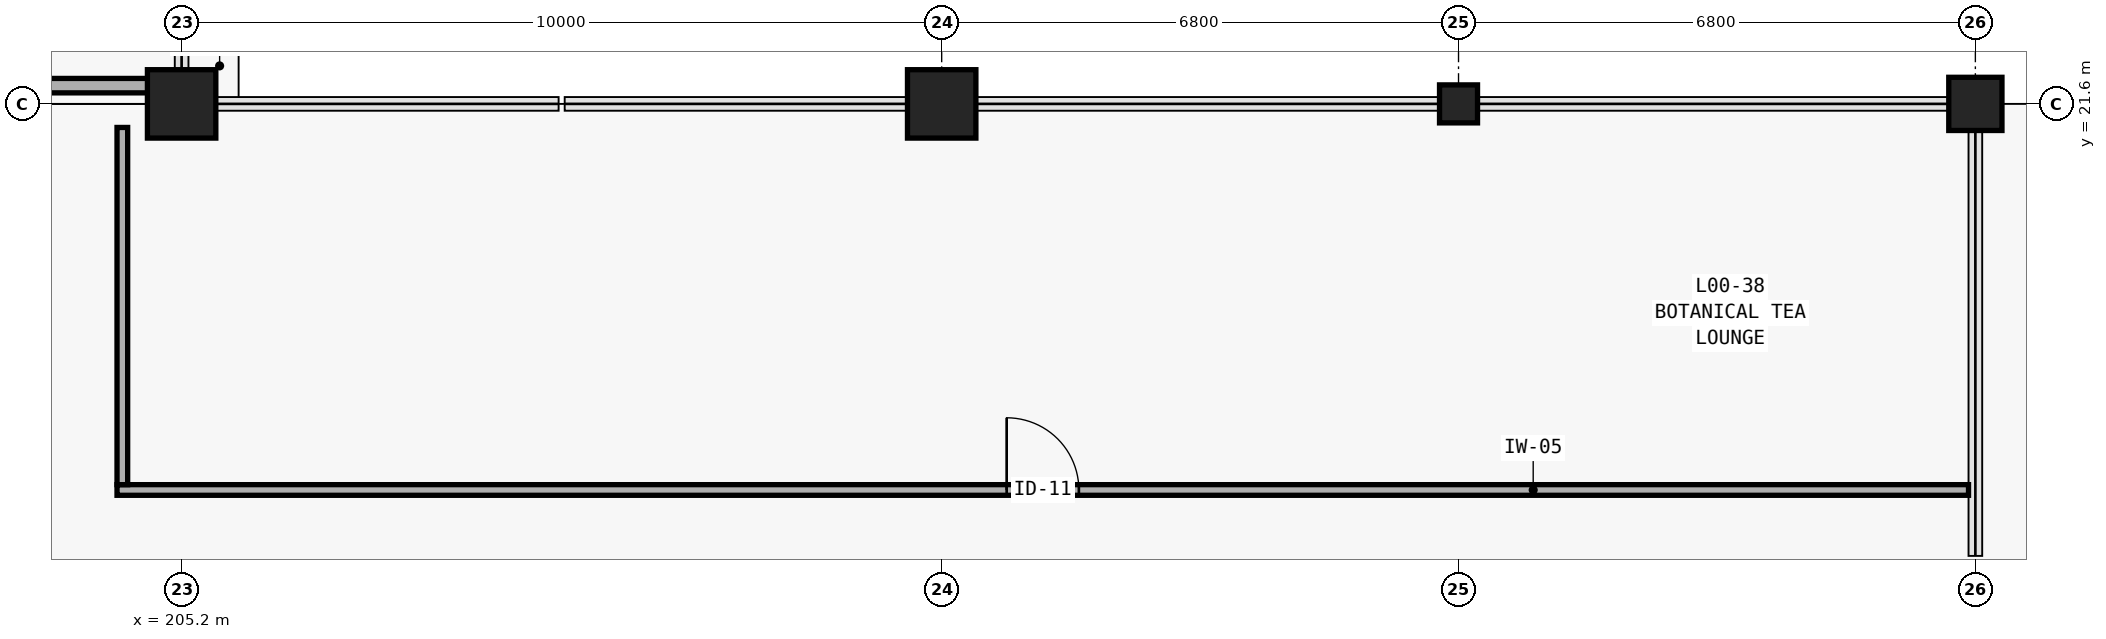
"""IFC4 building model, lengths in metres.
Left out: names, types, materials, properties, quantities, classifications, styles, units other than length and angle.
Written with IfcOpenShell. Run it as: python <this file> out.ifc"""

import sys

from ifc_helpers import new_model, si_unit, direction, frame, frame_2d, origin, origin_2d, place, context, subcontext, project, spatial, rectangle, extrude, element, fill, save


model = new_model("IFC4")
c1 = context("Model", 3, precision=1e-05, world=origin(), true_north=direction((0.0, 1.0)))
c2 = subcontext(c1, "Body", "Model", "MODEL_VIEW")
j1 = project(units=[si_unit("LENGTHUNIT", "METRE"), si_unit("PLANEANGLEUNIT", "RADIAN")], contexts=[c1])
p1 = place(None, origin())
s1 = spatial("IfcSite", under=j1, at=p1, CompositionType="ELEMENT")
p2 = place(p1, origin())
s2 = spatial("IfcBuilding", under=s1, at=p2, CompositionType="ELEMENT")
p3 = place(p2, origin())
s3 = spatial("IfcBuildingStorey", under=s2, at=p3, CompositionType="ELEMENT", Elevation=0.0)
for number, where, z_axis, x_axis in (
    (1, (205.2, 21.6, 0.0), (0.0, 0.0, 1.0), (1.0, 0.0, 0.0)),
    (2, (215.2, 21.6, 0.0), (0.0, 0.0, 1.0), (1.0, 0.0, 0.0)),
):
    element("IfcColumn", number, at=place(p3, frame(where, z_axis=z_axis, x_axis=x_axis)), inside=s3, PredefinedType="COLUMN", context=c2, shape_type="SweptSolid", body=[
        extrude(rectangle(XDim=0.9, YDim=0.9, at=origin_2d()), origin(), (0.0, 0.0, 1.0), 4.8),
    ])
p4 = place(p3, frame((222.0, 21.6, 0.0), z_axis=(0.0, 0.0, 1.0), x_axis=(1.0, 0.0, 0.0)))
e3 = element("IfcColumn", 3, at=p4, inside=s3, PredefinedType="COLUMN", context=c2, shape_type="SweptSolid", body=[
    extrude(rectangle(XDim=0.5, YDim=0.5, at=origin_2d()), origin(), (0.0, 0.0, 1.0), 4.8),
])
p5 = place(p3, frame((228.8, 21.6, 0.0), z_axis=(0.0, 0.0, 1.0), x_axis=(1.0, 0.0, 0.0)))
e4 = element("IfcColumn", 4, at=p5, inside=s3, PredefinedType="COLUMN", context=c2, shape_type="SweptSolid", body=[
    extrude(rectangle(XDim=0.7, YDim=0.7, at=origin_2d()), origin(), (0.0, 0.0, 1.0), 4.8),
])
p6 = place(p3, frame((204.35, 16.52, 0.0), z_axis=(0.0, 0.0, 1.0), x_axis=(1.0, 0.0, 0.0)))
e5 = element("IfcWall", 5, at=p6, inside=s3, PredefinedType="PARTITIONING", context=c2, shape_type="SweptSolid", body=[
    extrude(rectangle(XDim=24.36, YDim=0.14, at=frame_2d((12.18, 0.0))), origin(), (0.0, 0.0, 1.0), 3.38),
])
p7 = place(p6, frame((11.705, 0.0, 0.0)))
e6 = element("IfcOpeningElement", 6, at=p7, cuts=e5, PredefinedType="OPENING", context=c2, shape_type="SweptSolid", body=[
    extrude(rectangle(XDim=0.95, YDim=2.15, at=frame_2d((0.475, 1.075))), frame((0.0, 0.085, 0.0), z_axis=(0.0, -1.0, 0.0), x_axis=(1.0, 0.0, 0.0)), (0.0, 0.0, 1.0), 0.17),
])
p8 = place(p3, frame((195.65, 21.84, 0.0), z_axis=(0.0, 0.0, 1.0), x_axis=(1.0, 0.0, 0.0)))
e7 = element("IfcWall", 7, at=p8, inside=s3, PredefinedType="PARTITIONING", context=c2, shape_type="SweptSolid", body=[
    extrude(rectangle(XDim=9.23, YDim=0.19, at=frame_2d((4.615, 0.0))), origin(), (0.0, 0.0, 1.0), 3.38),
])
p9 = place(p3, frame((204.42, 16.59, 0.0), z_axis=(0.0, 0.0, 1.0), x_axis=(0.0, 1.0, 0.0)))
e8 = element("IfcWall", 8, at=p9, inside=s3, PredefinedType="PARTITIONING", context=c2, shape_type="SweptSolid", body=[
    extrude(rectangle(XDim=4.7, YDim=0.14, at=frame_2d((2.35, 0.0))), origin(), (0.0, 0.0, 1.0), 3.38),
])
p10 = place(p7, origin())
e9 = element("IfcDoor", 9, at=p10, inside=s3, OperationType="SINGLE_SWING_LEFT", PredefinedType="DOOR", context=c2, shape_type="SweptSolid", body=[
    extrude(rectangle(XDim=0.95, YDim=2.15, at=frame_2d((0.475, 1.075))), frame((0.0, 0.025, 0.0), z_axis=(0.0, -1.0, 0.0), x_axis=(1.0, 0.0, 0.0)), (0.0, 0.0, 1.0), 0.05),
])
fill(e6, e9)
save(model, sys.argv[1])
